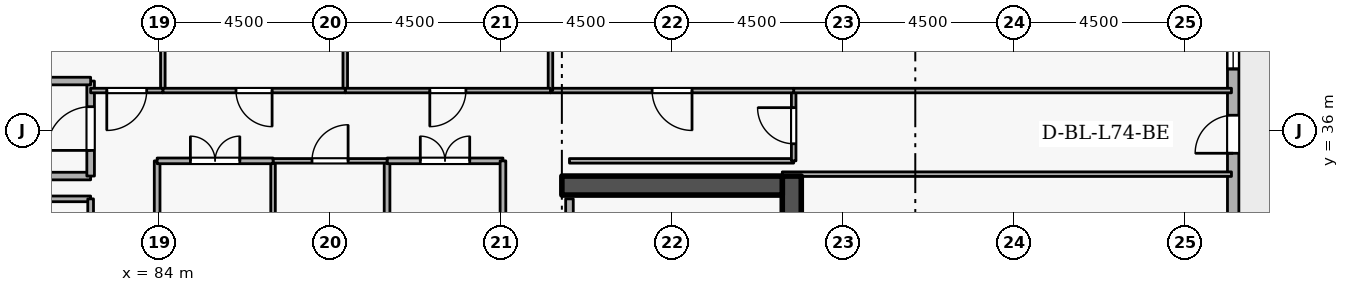
"""IFC4 building model, lengths in metres.
Left out: names, types, materials, properties, quantities, classifications, styles, units other than length and angle.
Written with IfcOpenShell. Run it as: python <this file> out.ifc"""

import sys

from ifc_helpers import new_model, si_unit, direction, frame, frame_2d, origin, place, context, subcontext, project, spatial, rectangle, extrude, element, fill, save


model = new_model("IFC4")
c1 = context("Model", 3, precision=1e-05, world=origin(), true_north=direction((0.0, 1.0)))
c2 = subcontext(c1, "Body", "Model", "MODEL_VIEW")
j1 = project(units=[si_unit("LENGTHUNIT", "METRE"), si_unit("PLANEANGLEUNIT", "RADIAN")], contexts=[c1])
p1 = place(None, origin())
s1 = spatial("IfcSite", under=j1, at=p1, CompositionType="ELEMENT")
p2 = place(p1, origin())
s2 = spatial("IfcBuilding", under=s1, at=p2, CompositionType="ELEMENT")
p3 = place(p2, frame((0.0, 0.0, 276.3)))
s3 = spatial("IfcBuildingStorey", under=s2, at=p3, CompositionType="ELEMENT", Elevation=276.3)
p4 = place(p3, frame((100.65, 19.2, 0.0), z_axis=(0.0, 0.0, 1.0), x_axis=(0.0, 1.0, 0.0)))
e1 = element("IfcWall", 1, at=p4, inside=s3, PredefinedType="SHEAR", context=c2, shape_type="SweptSolid", body=[
    extrude(rectangle(XDim=15.6, YDim=0.5, at=frame_2d((7.8, 0.0))), origin(), (0.0, 0.0, 1.0), 3.6),
])
p5 = place(p3, frame((94.6, 34.55, 0.0), z_axis=(0.0, 0.0, 1.0), x_axis=(1.0, 0.0, 0.0)))
e2 = element("IfcWall", 2, at=p5, inside=s3, PredefinedType="SHEAR", context=c2, shape_type="SweptSolid", body=[
    extrude(rectangle(XDim=5.8, YDim=0.5, at=frame_2d((2.9, 0.0))), origin(), (0.0, 0.0, 1.0), 3.6),
])
p6 = place(p3, frame((112.265, 11.819, 0.0), z_axis=(0.0, 0.0, 1.0), x_axis=(0.0, 1.0, 0.0)))
e3 = element("IfcWall", 3, at=p6, inside=s3, PredefinedType="STANDARD", context=c2, shape_type="SweptSolid", body=[
    extrude(rectangle(XDim=36.363, YDim=0.3, at=frame_2d((18.181, 0.0))), origin(), (0.0, 0.0, 1.0), 2.66),
])
p7 = place(p6, frame((23.581, 0.0, 0.0)))
e4 = element("IfcOpeningElement", 4, at=p7, cuts=e3, PredefinedType="OPENING", context=c2, shape_type="SweptSolid", body=[
    extrude(rectangle(XDim=1.0, YDim=2.08, at=frame_2d((0.5, 1.04))), frame((0.0, 0.16, 0.0), z_axis=(0.0, -1.0, 0.0), x_axis=(1.0, 0.0, 0.0)), (0.0, 0.0, 1.0), 0.32),
])
p8 = place(p6, frame((1.8, 0.0, 0.72)))
e5 = element("IfcOpeningElement", 5, at=p8, cuts=e3, PredefinedType="OPENING", context=c2, shape_type="SweptSolid", body=[
    extrude(rectangle(XDim=0.9, YDim=1.75, at=frame_2d((0.45, 0.875))), frame((0.0, 0.16, 0.0), z_axis=(0.0, -1.0, 0.0), x_axis=(1.0, 0.0, 0.0)), (0.0, 0.0, 1.0), 0.32),
])
p9 = place(p6, frame((6.6, 0.0, 0.72)))
e6 = element("IfcOpeningElement", 6, at=p9, cuts=e3, PredefinedType="OPENING", context=c2, shape_type="SweptSolid", body=[
    extrude(rectangle(XDim=0.9, YDim=1.75, at=frame_2d((0.45, 0.875))), frame((0.0, 0.16, 0.0), z_axis=(0.0, -1.0, 0.0), x_axis=(1.0, 0.0, 0.0)), (0.0, 0.0, 1.0), 0.32),
])
p10 = place(p6, frame((11.4, 0.0, 0.72)))
e7 = element("IfcOpeningElement", 7, at=p10, cuts=e3, PredefinedType="OPENING", context=c2, shape_type="SweptSolid", body=[
    extrude(rectangle(XDim=0.9, YDim=1.75, at=frame_2d((0.45, 0.875))), frame((0.0, 0.16, 0.0), z_axis=(0.0, -1.0, 0.0), x_axis=(1.0, 0.0, 0.0)), (0.0, 0.0, 1.0), 0.32),
])
p11 = place(p6, frame((16.2, 0.0, 0.72)))
e8 = element("IfcOpeningElement", 8, at=p11, cuts=e3, PredefinedType="OPENING", context=c2, shape_type="SweptSolid", body=[
    extrude(rectangle(XDim=0.9, YDim=1.75, at=frame_2d((0.45, 0.875))), frame((0.0, 0.16, 0.0), z_axis=(0.0, -1.0, 0.0), x_axis=(1.0, 0.0, 0.0)), (0.0, 0.0, 1.0), 0.32),
])
p12 = place(p6, frame((21.0, 0.0, 0.72)))
e9 = element("IfcOpeningElement", 9, at=p12, cuts=e3, PredefinedType="OPENING", context=c2, shape_type="SweptSolid", body=[
    extrude(rectangle(XDim=0.9, YDim=1.75, at=frame_2d((0.45, 0.875))), frame((0.0, 0.16, 0.0), z_axis=(0.0, -1.0, 0.0), x_axis=(1.0, 0.0, 0.0)), (0.0, 0.0, 1.0), 0.32),
])
p13 = place(p6, frame((25.8, 0.0, 0.72)))
e10 = element("IfcOpeningElement", 10, at=p13, cuts=e3, PredefinedType="OPENING", context=c2, shape_type="SweptSolid", body=[
    extrude(rectangle(XDim=0.9, YDim=1.75, at=frame_2d((0.45, 0.875))), frame((0.0, 0.16, 0.0), z_axis=(0.0, -1.0, 0.0), x_axis=(1.0, 0.0, 0.0)), (0.0, 0.0, 1.0), 0.32),
])
p14 = place(p6, frame((30.6, 0.0, 0.72)))
e11 = element("IfcOpeningElement", 11, at=p14, cuts=e3, PredefinedType="OPENING", context=c2, shape_type="SweptSolid", body=[
    extrude(rectangle(XDim=0.9, YDim=1.75, at=frame_2d((0.45, 0.875))), frame((0.0, 0.16, 0.0), z_axis=(0.0, -1.0, 0.0), x_axis=(1.0, 0.0, 0.0)), (0.0, 0.0, 1.0), 0.32),
])
p15 = place(p3, frame((79.9, 34.8, 0.0), z_axis=(0.0, 0.0, 1.0), x_axis=(1.0, 0.0, 0.0)))
e12 = element("IfcWall", 12, at=p15, inside=s3, PredefinedType="STANDARD", context=c2, shape_type="SweptSolid", body=[
    extrude(rectangle(XDim=2.3, YDim=0.2, at=frame_2d((1.15, 0.0))), origin(), (0.0, 0.0, 1.0), 2.465),
])
p16 = place(p3, frame((82.2, 34.8, 0.0), z_axis=(0.0, 0.0, 1.0), x_axis=(0.0, 1.0, 0.0)))
e13 = element("IfcWall", 13, at=p16, inside=s3, PredefinedType="STANDARD", context=c2, shape_type="SweptSolid", body=[
    extrude(rectangle(XDim=2.5, YDim=0.2, at=frame_2d((1.25, 0.0))), origin(), (0.0, 0.0, 1.0), 3.26),
])
p17 = place(p16, frame((0.675, 0.0, 0.0)))
e14 = element("IfcOpeningElement", 14, at=p17, cuts=e13, PredefinedType="OPENING", context=c2, shape_type="SweptSolid", body=[
    extrude(rectangle(XDim=1.15, YDim=2.1, at=frame_2d((0.575, 1.05))), frame((0.0, 0.11, 0.0), z_axis=(0.0, -1.0, 0.0), x_axis=(1.0, 0.0, 0.0)), (0.0, 0.0, 1.0), 0.22),
])
p18 = place(p3, frame((82.2, 37.3, 0.0), z_axis=(0.0, 0.0, 1.0), x_axis=(-1.0, 0.0, 0.0)))
e15 = element("IfcWall", 15, at=p18, inside=s3, PredefinedType="STANDARD", context=c2, shape_type="SweptSolid", body=[
    extrude(rectangle(XDim=5.7, YDim=0.2, at=frame_2d((2.85, 0.0))), origin(), (0.0, 0.0, 1.0), 3.26),
])
p19 = place(p3, frame((94.8, 32.0, 0.0), z_axis=(0.0, 0.0, 1.0), x_axis=(0.0, 1.0, 0.0)))
e16 = element("IfcWall", 16, at=p19, inside=s3, PredefinedType="STANDARD", context=c2, shape_type="SweptSolid", body=[
    extrude(rectangle(XDim=2.2, YDim=0.2, at=frame_2d((1.1, 0.0))), origin(), (0.0, 0.0, 1.0), 3.26),
])
p20 = place(p19, frame((0.525, 0.0, 0.0)))
e17 = element("IfcOpeningElement", 17, at=p20, cuts=e16, PredefinedType="OPENING", context=c2, shape_type="SweptSolid", body=[
    extrude(rectangle(XDim=1.15, YDim=2.1, at=frame_2d((0.575, 1.05))), frame((0.0, 0.11, 0.0), z_axis=(0.0, -1.0, 0.0), x_axis=(1.0, 0.0, 0.0)), (0.0, 0.0, 1.0), 0.22),
])
p21 = place(p3, frame((80.15, 34.2, 0.0), z_axis=(0.0, 0.0, 1.0), x_axis=(1.0, 0.0, 0.0)))
e18 = element("IfcWall", 18, at=p21, inside=s3, PredefinedType="PARTITIONING", context=c2, shape_type="SweptSolid", body=[
    extrude(rectangle(XDim=2.05, YDim=0.15, at=frame_2d((1.025, 0.0))), origin(), (0.0, 0.0, 1.0), 2.465),
])
p22 = place(p3, frame((82.2, 34.2, 0.0), z_axis=(0.0, 0.0, 1.0), x_axis=(0.0, -1.0, 0.0)))
e19 = element("IfcWall", 19, at=p22, inside=s3, PredefinedType="PARTITIONING", context=c2, shape_type="SweptSolid", body=[
    extrude(rectangle(XDim=2.35, YDim=0.15, at=frame_2d((1.175, 0.0))), origin(), (0.0, 0.0, 1.0), 3.26),
])
p23 = place(p22, frame((0.715, 0.0, 0.0)))
e20 = element("IfcOpeningElement", 20, at=p23, cuts=e19, PredefinedType="OPENING", context=c2, shape_type="SweptSolid", body=[
    extrude(rectangle(XDim=0.92, YDim=2.08, at=frame_2d((0.46, 1.04))), frame((0.0, 0.085, 0.0), z_axis=(0.0, -1.0, 0.0), x_axis=(1.0, 0.0, 0.0)), (0.0, 0.0, 1.0), 0.17),
])
p24 = place(p3, frame((94.8, 35.2, 0.0), z_axis=(0.0, 0.0, 1.0), x_axis=(1.0, 0.0, 0.0)))
e21 = element("IfcWall", 21, at=p24, inside=s3, PredefinedType="PARTITIONING", context=c2, shape_type="SweptSolid", body=[
    extrude(rectangle(XDim=5.9, YDim=0.12, at=frame_2d((2.95, 0.0))), origin(), (0.0, 0.0, 1.0), 3.26),
])
p25 = place(p3, frame((100.7, 35.2, 0.0), z_axis=(0.0, 0.0, 1.0), x_axis=(0.0, 1.0, 0.0)))
e22 = element("IfcWall", 22, at=p25, inside=s3, PredefinedType="PARTITIONING", context=c2, shape_type="SweptSolid", body=[
    extrude(rectangle(XDim=1.85, YDim=0.12, at=frame_2d((0.925, 0.0))), origin(), (0.0, 0.0, 1.0), 3.26),
])
p26 = place(p25, frame((0.45, 0.0, 0.0)))
e23 = element("IfcOpeningElement", 23, at=p26, cuts=e22, PredefinedType="OPENING", context=c2, shape_type="SweptSolid", body=[
    extrude(rectangle(XDim=0.95, YDim=2.1, at=frame_2d((0.475, 1.05))), frame((0.0, 0.07, 0.0), z_axis=(0.0, -1.0, 0.0), x_axis=(1.0, 0.0, 0.0)), (0.0, 0.0, 1.0), 0.14),
])
p27 = place(p3, frame((100.7, 37.05, 0.0), z_axis=(0.0, 0.0, 1.0), x_axis=(1.0, 0.0, 0.0)))
e24 = element("IfcWall", 24, at=p27, inside=s3, PredefinedType="PARTITIONING", context=c2, shape_type="SweptSolid", body=[
    extrude(rectangle(XDim=11.52, YDim=0.12, at=frame_2d((5.76, 0.0))), origin(), (0.0, 0.0, 1.0), 3.26),
])
p28 = place(p3, frame((112.22, 34.85, 0.0), z_axis=(0.0, 0.0, 1.0), x_axis=(-1.0, 0.0, 0.0)))
e25 = element("IfcWall", 25, at=p28, inside=s3, PredefinedType="PARTITIONING", context=c2, shape_type="SweptSolid", body=[
    extrude(rectangle(XDim=11.82, YDim=0.12, at=frame_2d((5.91, 0.0))), origin(), (0.0, 0.0, 1.0), 2.465),
])
p29 = place(p3, frame((100.7, 37.05, 0.0), z_axis=(0.0, 0.0, 1.0), x_axis=(-1.0, 0.0, 0.0)))
e26 = element("IfcWall", 26, at=p29, inside=s3, PredefinedType="PARTITIONING", context=c2, shape_type="SweptSolid", body=[
    extrude(rectangle(XDim=6.4, YDim=0.12, at=frame_2d((3.2, 0.0))), origin(), (0.0, 0.0, 1.0), 3.26),
])
p30 = place(p29, frame((2.675, 0.0, 0.0)))
e27 = element("IfcOpeningElement", 27, at=p30, cuts=e26, PredefinedType="OPENING", context=c2, shape_type="SweptSolid", body=[
    extrude(rectangle(XDim=1.05, YDim=2.1, at=frame_2d((0.525, 1.05))), frame((0.0, 0.07, 0.0), z_axis=(0.0, -1.0, 0.0), x_axis=(1.0, 0.0, 0.0)), (0.0, 0.0, 1.0), 0.14),
])
for number, where, z_axis, x_axis in (
    (28, (94.3, 37.05, 0.0), (0.0, 0.0, 1.0), (0.0, 1.0, 0.0)),
    (29, (88.9, 37.05, 0.0), (0.0, 0.0, 1.0), (0.0, 1.0, 0.0)),
):
    element("IfcWall", number, at=place(p3, frame(where, z_axis=z_axis, x_axis=x_axis)), inside=s3, PredefinedType="PARTITIONING", context=c2, shape_type="SweptSolid", body=[
        extrude(rectangle(XDim=13.67, YDim=0.12, at=frame_2d((6.835, 0.0))), origin(), (0.0, 0.0, 1.0), 3.26),
    ])
p31 = place(p3, frame((94.3, 37.05, 0.0), z_axis=(0.0, 0.0, 1.0), x_axis=(-1.0, 0.0, 0.0)))
e30 = element("IfcWall", 30, at=p31, inside=s3, PredefinedType="PARTITIONING", context=c2, shape_type="SweptSolid", body=[
    extrude(rectangle(XDim=5.4, YDim=0.12, at=frame_2d((2.7, 0.0))), origin(), (0.0, 0.0, 1.0), 3.26),
])
p32 = place(p31, frame((2.225, 0.0, 0.0)))
e31 = element("IfcOpeningElement", 31, at=p32, cuts=e30, PredefinedType="OPENING", context=c2, shape_type="SweptSolid", body=[
    extrude(rectangle(XDim=0.95, YDim=2.1, at=frame_2d((0.475, 1.05))), frame((0.0, 0.07, 0.0), z_axis=(0.0, -1.0, 0.0), x_axis=(1.0, 0.0, 0.0)), (0.0, 0.0, 1.0), 0.14),
])
p33 = place(p3, frame((84.1, 37.05, 0.0), z_axis=(0.0, 0.0, 1.0), x_axis=(0.0, 1.0, 0.0)))
e32 = element("IfcWall", 32, at=p33, inside=s3, PredefinedType="PARTITIONING", context=c2, shape_type="SweptSolid", body=[
    extrude(rectangle(XDim=13.67, YDim=0.12, at=frame_2d((6.835, 0.0))), origin(), (0.0, 0.0, 1.0), 3.26),
])
p34 = place(p3, frame((88.9, 37.05, 0.0), z_axis=(0.0, 0.0, 1.0), x_axis=(-1.0, 0.0, 0.0)))
e33 = element("IfcWall", 33, at=p34, inside=s3, PredefinedType="PARTITIONING", context=c2, shape_type="SweptSolid", body=[
    extrude(rectangle(XDim=4.8, YDim=0.12, at=frame_2d((2.4, 0.0))), origin(), (0.0, 0.0, 1.0), 3.26),
])
p35 = place(p34, frame((1.925, 0.0, 0.0)))
e34 = element("IfcOpeningElement", 34, at=p35, cuts=e33, PredefinedType="OPENING", context=c2, shape_type="SweptSolid", body=[
    extrude(rectangle(XDim=0.95, YDim=2.1, at=frame_2d((0.475, 1.05))), frame((0.0, 0.07, 0.0), z_axis=(0.0, -1.0, 0.0), x_axis=(1.0, 0.0, 0.0)), (0.0, 0.0, 1.0), 0.14),
])
p36 = place(p3, frame((84.1, 37.05, 0.0), z_axis=(0.0, 0.0, 1.0), x_axis=(-1.0, 0.0, 0.0)))
e35 = element("IfcWall", 35, at=p36, inside=s3, PredefinedType="PARTITIONING", context=c2, shape_type="SweptSolid", body=[
    extrude(rectangle(XDim=1.9, YDim=0.12, at=frame_2d((0.95, 0.0))), origin(), (0.0, 0.0, 1.0), 3.26),
])
p37 = place(p36, frame((0.425, 0.0, 0.0)))
e36 = element("IfcOpeningElement", 36, at=p37, cuts=e35, PredefinedType="OPENING", context=c2, shape_type="SweptSolid", body=[
    extrude(rectangle(XDim=1.05, YDim=2.1, at=frame_2d((0.525, 1.05))), frame((0.0, 0.07, 0.0), z_axis=(0.0, -1.0, 0.0), x_axis=(1.0, 0.0, 0.0)), (0.0, 0.0, 1.0), 0.14),
])
p38 = place(p3, frame((90.0, 32.2, 0.0), z_axis=(0.0, 0.0, 1.0), x_axis=(0.0, 1.0, 0.0)))
e37 = element("IfcWall", 37, at=p38, inside=s3, PredefinedType="PARTITIONING", context=c2, shape_type="SweptSolid", body=[
    extrude(rectangle(XDim=3.0, YDim=0.15, at=frame_2d((1.5, 0.0))), origin(), (0.0, 0.0, 1.0), 3.26),
])
p39 = place(p3, frame((90.0, 35.2, 0.0), z_axis=(0.0, 0.0, 1.0), x_axis=(1.0, 0.0, 0.0)))
e38 = element("IfcWall", 38, at=p39, inside=s3, PredefinedType="PARTITIONING", context=c2, shape_type="SweptSolid", body=[
    extrude(rectangle(XDim=3.05, YDim=0.15, at=frame_2d((1.525, 0.0))), origin(), (0.0, 0.0, 1.0), 3.26),
])
p40 = place(p39, frame((0.875, 0.0, 0.0)))
e39 = element("IfcOpeningElement", 39, at=p40, cuts=e38, PredefinedType="OPENING", context=c2, shape_type="SweptSolid", body=[
    extrude(rectangle(XDim=1.3, YDim=2.12, at=frame_2d((0.65, 1.06))), frame((0.0, 0.085, 0.0), z_axis=(0.0, -1.0, 0.0), x_axis=(1.0, 0.0, 0.0)), (0.0, 0.0, 1.0), 0.17),
])
p41 = place(p3, frame((93.05, 35.2, 0.0), z_axis=(0.0, 0.0, 1.0), x_axis=(0.0, -1.0, 0.0)))
e40 = element("IfcWall", 40, at=p41, inside=s3, PredefinedType="PARTITIONING", context=c2, shape_type="SweptSolid", body=[
    extrude(rectangle(XDim=3.0, YDim=0.15, at=frame_2d((1.5, 0.0))), origin(), (0.0, 0.0, 1.0), 3.26),
])
p42 = place(p3, frame((87.0, 32.2, 0.0), z_axis=(0.0, 0.0, 1.0), x_axis=(0.0, 1.0, 0.0)))
e41 = element("IfcWall", 41, at=p42, inside=s3, PredefinedType="PARTITIONING", context=c2, shape_type="SweptSolid", body=[
    extrude(rectangle(XDim=3.0, YDim=0.12, at=frame_2d((1.5, 0.0))), origin(), (0.0, 0.0, 1.0), 3.26),
])
p43 = place(p3, frame((87.0, 35.2, 0.0), z_axis=(0.0, 0.0, 1.0), x_axis=(1.0, 0.0, 0.0)))
e42 = element("IfcWall", 42, at=p43, inside=s3, PredefinedType="PARTITIONING", context=c2, shape_type="SweptSolid", body=[
    extrude(rectangle(XDim=3.0, YDim=0.12, at=frame_2d((1.5, 0.0))), origin(), (0.0, 0.0, 1.0), 3.26),
])
p44 = place(p43, frame((1.025, 0.0, 0.0)))
e43 = element("IfcOpeningElement", 43, at=p44, cuts=e42, PredefinedType="OPENING", context=c2, shape_type="SweptSolid", body=[
    extrude(rectangle(XDim=0.95, YDim=2.1, at=frame_2d((0.475, 1.05))), frame((0.0, 0.07, 0.0), z_axis=(0.0, -1.0, 0.0), x_axis=(1.0, 0.0, 0.0)), (0.0, 0.0, 1.0), 0.14),
])
p45 = place(p3, frame((83.95, 32.2, 0.0), z_axis=(0.0, 0.0, 1.0), x_axis=(0.0, 1.0, 0.0)))
e44 = element("IfcWall", 44, at=p45, inside=s3, PredefinedType="PARTITIONING", context=c2, shape_type="SweptSolid", body=[
    extrude(rectangle(XDim=3.0, YDim=0.15, at=frame_2d((1.5, 0.0))), origin(), (0.0, 0.0, 1.0), 3.26),
])
p46 = place(p3, frame((83.95, 35.2, 0.0), z_axis=(0.0, 0.0, 1.0), x_axis=(1.0, 0.0, 0.0)))
e45 = element("IfcWall", 45, at=p46, inside=s3, PredefinedType="PARTITIONING", context=c2, shape_type="SweptSolid", body=[
    extrude(rectangle(XDim=3.05, YDim=0.15, at=frame_2d((1.525, 0.0))), origin(), (0.0, 0.0, 1.0), 3.26),
])
p47 = place(p46, frame((0.875, 0.0, 0.0)))
e46 = element("IfcOpeningElement", 46, at=p47, cuts=e45, PredefinedType="OPENING", context=c2, shape_type="SweptSolid", body=[
    extrude(rectangle(XDim=1.3, YDim=2.12, at=frame_2d((0.65, 1.06))), frame((0.0, 0.085, 0.0), z_axis=(0.0, -1.0, 0.0), x_axis=(1.0, 0.0, 0.0)), (0.0, 0.0, 1.0), 0.17),
])
p48 = place(p7, origin())
e47 = element("IfcDoor", 47, at=p48, inside=s3, OperationType="SINGLE_SWING_LEFT", PredefinedType="DOOR", context=c2, shape_type="SweptSolid", body=[
    extrude(rectangle(XDim=1.0, YDim=2.08, at=frame_2d((0.5, 1.04))), frame((0.0, 0.025, 0.0), z_axis=(0.0, -1.0, 0.0), x_axis=(1.0, 0.0, 0.0)), (0.0, 0.0, 1.0), 0.05),
])
fill(e4, e47)
p49 = place(p13, origin())
e48 = element("IfcWindow", 48, at=p49, inside=s3, PartitioningType="SINGLE_PANEL", PredefinedType="WINDOW", context=c2, shape_type="SweptSolid", body=[
    extrude(rectangle(XDim=0.9, YDim=1.75, at=frame_2d((0.45, 0.875))), frame((0.0, 0.03, 0.0), z_axis=(0.0, -1.0, 0.0), x_axis=(1.0, 0.0, 0.0)), (0.0, 0.0, 1.0), 0.06),
])
fill(e10, e48)
p50 = place(p17, origin())
e49 = element("IfcDoor", 49, at=p50, inside=s3, OperationType="SINGLE_SWING_LEFT", PredefinedType="DOOR", context=c2, shape_type="SweptSolid", body=[
    extrude(rectangle(XDim=1.15, YDim=2.1, at=frame_2d((0.575, 1.05))), frame((0.0, 0.025, 0.0), z_axis=(0.0, -1.0, 0.0), x_axis=(1.0, 0.0, 0.0)), (0.0, 0.0, 1.0), 0.05),
])
fill(e14, e49)
p51 = place(p26, origin())
e50 = element("IfcDoor", 50, at=p51, inside=s3, OperationType="SINGLE_SWING_RIGHT", PredefinedType="DOOR", context=c2, shape_type="SweptSolid", body=[
    extrude(rectangle(XDim=0.95, YDim=2.1, at=frame_2d((0.475, 1.05))), frame((0.0, 0.025, 0.0), z_axis=(0.0, -1.0, 0.0), x_axis=(1.0, 0.0, 0.0)), (0.0, 0.0, 1.0), 0.05),
])
fill(e23, e50)
p52 = place(p30, origin())
e51 = element("IfcDoor", 51, at=p52, inside=s3, OperationType="SINGLE_SWING_LEFT", PredefinedType="DOOR", context=c2, shape_type="SweptSolid", body=[
    extrude(rectangle(XDim=1.05, YDim=2.1, at=frame_2d((0.525, 1.05))), frame((0.0, 0.025, 0.0), z_axis=(0.0, -1.0, 0.0), x_axis=(1.0, 0.0, 0.0)), (0.0, 0.0, 1.0), 0.05),
])
fill(e27, e51)
p53 = place(p32, origin())
e52 = element("IfcDoor", 52, at=p53, inside=s3, OperationType="SINGLE_SWING_RIGHT", PredefinedType="DOOR", context=c2, shape_type="SweptSolid", body=[
    extrude(rectangle(XDim=0.95, YDim=2.1, at=frame_2d((0.475, 1.05))), frame((0.0, 0.025, 0.0), z_axis=(0.0, -1.0, 0.0), x_axis=(1.0, 0.0, 0.0)), (0.0, 0.0, 1.0), 0.05),
])
fill(e31, e52)
p54 = place(p35, origin())
e53 = element("IfcDoor", 53, at=p54, inside=s3, OperationType="SINGLE_SWING_LEFT", PredefinedType="DOOR", context=c2, shape_type="SweptSolid", body=[
    extrude(rectangle(XDim=0.95, YDim=2.1, at=frame_2d((0.475, 1.05))), frame((0.0, 0.025, 0.0), z_axis=(0.0, -1.0, 0.0), x_axis=(1.0, 0.0, 0.0)), (0.0, 0.0, 1.0), 0.05),
])
fill(e34, e53)
p55 = place(p37, origin())
e54 = element("IfcDoor", 54, at=p55, inside=s3, OperationType="SINGLE_SWING_RIGHT", PredefinedType="DOOR", context=c2, shape_type="SweptSolid", body=[
    extrude(rectangle(XDim=1.05, YDim=2.1, at=frame_2d((0.525, 1.05))), frame((0.0, 0.025, 0.0), z_axis=(0.0, -1.0, 0.0), x_axis=(1.0, 0.0, 0.0)), (0.0, 0.0, 1.0), 0.05),
])
fill(e36, e54)
p56 = place(p40, origin())
e55 = element("IfcDoor", 55, at=p56, inside=s3, OperationType="DOUBLE_DOOR_SINGLE_SWING", PredefinedType="DOOR", context=c2, shape_type="SweptSolid", body=[
    extrude(rectangle(XDim=1.3, YDim=2.12, at=frame_2d((0.65, 1.06))), frame((0.0, 0.025, 0.0), z_axis=(0.0, -1.0, 0.0), x_axis=(1.0, 0.0, 0.0)), (0.0, 0.0, 1.0), 0.05),
])
fill(e39, e55)
p57 = place(p44, origin())
e56 = element("IfcDoor", 56, at=p57, inside=s3, OperationType="SINGLE_SWING_RIGHT", PredefinedType="DOOR", context=c2, shape_type="SweptSolid", body=[
    extrude(rectangle(XDim=0.95, YDim=2.1, at=frame_2d((0.475, 1.05))), frame((0.0, 0.025, 0.0), z_axis=(0.0, -1.0, 0.0), x_axis=(1.0, 0.0, 0.0)), (0.0, 0.0, 1.0), 0.05),
])
fill(e43, e56)
p58 = place(p47, origin())
e57 = element("IfcDoor", 57, at=p58, inside=s3, OperationType="DOUBLE_DOOR_SINGLE_SWING", PredefinedType="DOOR", context=c2, shape_type="SweptSolid", body=[
    extrude(rectangle(XDim=1.3, YDim=2.12, at=frame_2d((0.65, 1.06))), frame((0.0, 0.025, 0.0), z_axis=(0.0, -1.0, 0.0), x_axis=(1.0, 0.0, 0.0)), (0.0, 0.0, 1.0), 0.05),
])
fill(e46, e57)
save(model, sys.argv[1])
